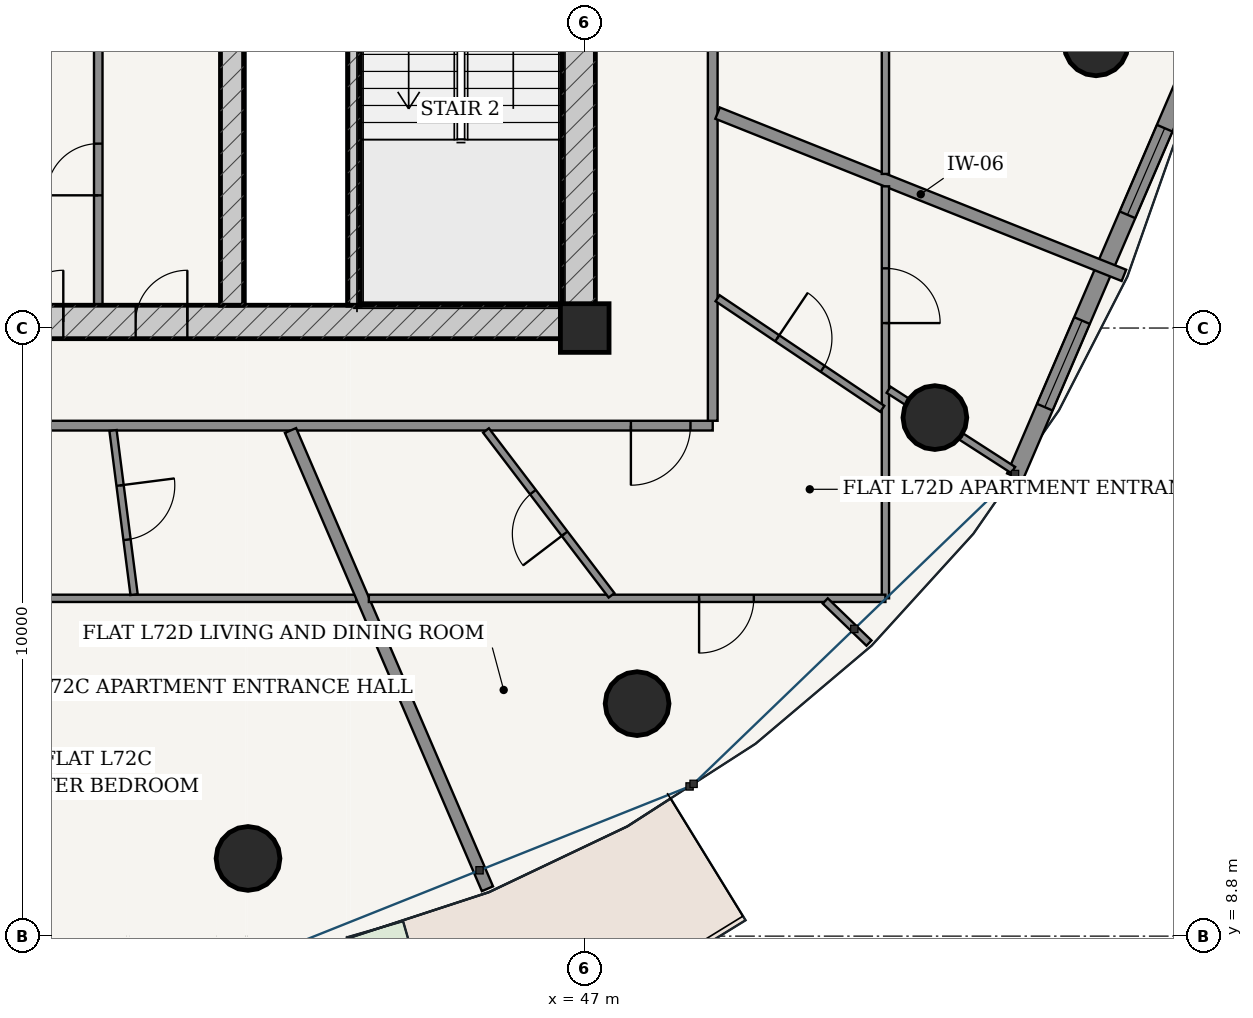
"""IFC4 building model, lengths in metres.
Left out: names, types, materials, properties, quantities, classifications, styles, units other than length and angle.
Written with IfcOpenShell. Run it as: python <this file> out.ifc"""

import sys

from ifc_helpers import new_model, si_unit, direction, frame, frame_2d, origin, origin_2d, place, context, subcontext, project, spatial, rectangle, hollow_circle, extrude, source, transform, mapped, element, fill, save


model = new_model("IFC4")
c1 = context("Model", 3, precision=1e-05, world=origin(), true_north=direction((-0.2419218956, 0.970295726276)))
c2 = subcontext(c1, "Body", "Model", "MODEL_VIEW")
j1 = project(units=[si_unit("LENGTHUNIT", "METRE"), si_unit("PLANEANGLEUNIT", "RADIAN")], contexts=[c1])
p1 = place(None, origin())
s1 = spatial("IfcSite", under=j1, at=p1, CompositionType="ELEMENT")
p2 = place(p1, origin())
s2 = spatial("IfcBuilding", under=s1, at=p2, CompositionType="ELEMENT")
p3 = place(p2, frame((0.0, 0.0, 274.45)))
s3 = spatial("IfcBuildingStorey", under=s2, at=p3, CompositionType="ELEMENT", Elevation=274.45)
p4 = place(p3, frame((47.0, 18.8, 0.0), z_axis=(0.0, 0.0, 1.0), x_axis=(1.0, 0.0, 0.0)))
e1 = element("IfcColumn", 1, at=p4, inside=s3, PredefinedType="COLUMN", context=c2, shape_type="SweptSolid", body=[
    extrude(rectangle(XDim=0.8, YDim=0.8, at=origin_2d()), origin(), (0.0, 0.0, 1.0), 3.75),
])
p5 = place(p3, frame((28.825, 18.9, 0.0), z_axis=(0.0, 0.0, 1.0), x_axis=(1.0, 0.0, 0.0)))
e2 = element("IfcWall", 2, at=p5, inside=s3, PredefinedType="SHEAR", context=c2, shape_type="SweptSolid", body=[
    extrude(rectangle(XDim=18.35, YDim=0.55, at=frame_2d((9.175, 0.0))), origin(), (0.0, 0.0, 1.0), 3.49),
])
p6 = place(p5, frame((6.71, 0.0, 0.0)))
e3 = element("IfcOpeningElement", 3, at=p6, cuts=e2, PredefinedType="OPENING", context=c2, shape_type="SweptSolid", body=[
    extrude(rectangle(XDim=0.85, YDim=2.1, at=frame_2d((0.425, 1.05))), frame((0.0, 0.285, 0.0), z_axis=(0.0, -1.0, 0.0), x_axis=(1.0, 0.0, 0.0)), (0.0, 0.0, 1.0), 0.57),
])
p7 = place(p5, frame((8.75, 0.0, 0.0)))
e4 = element("IfcOpeningElement", 4, at=p7, cuts=e2, PredefinedType="OPENING", context=c2, shape_type="SweptSolid", body=[
    extrude(rectangle(XDim=0.85, YDim=2.1, at=frame_2d((0.425, 1.05))), frame((0.0, 0.285, 0.0), z_axis=(0.0, -1.0, 0.0), x_axis=(1.0, 0.0, 0.0)), (0.0, 0.0, 1.0), 0.57),
])
p8 = place(p5, frame((10.79, 0.0, 0.0)))
e5 = element("IfcOpeningElement", 5, at=p8, cuts=e2, PredefinedType="OPENING", context=c2, shape_type="SweptSolid", body=[
    extrude(rectangle(XDim=0.85, YDim=2.1, at=frame_2d((0.425, 1.05))), frame((0.0, 0.285, 0.0), z_axis=(0.0, -1.0, 0.0), x_axis=(1.0, 0.0, 0.0)), (0.0, 0.0, 1.0), 0.57),
])
p9 = place(p3, frame((46.9, 19.175, 0.0), z_axis=(0.0, 0.0, 1.0), x_axis=(0.0, 1.0, 0.0)))
e6 = element("IfcWall", 6, at=p9, inside=s3, PredefinedType="SHEAR", context=c2, shape_type="SweptSolid", body=[
    extrude(rectangle(XDim=15.25, YDim=0.55, at=frame_2d((7.625, 0.0))), origin(), (0.0, 0.0, 1.0), 3.49),
])
p10 = place(p9, frame((9.875, 0.0, 0.0)))
e7 = element("IfcOpeningElement", 7, at=p10, cuts=e6, PredefinedType="OPENING", context=c2, shape_type="SweptSolid", body=[
    extrude(rectangle(XDim=1.5, YDim=2.2, at=frame_2d((0.75, 1.1))), frame((0.0, 0.285, 0.0), z_axis=(0.0, -1.0, 0.0), x_axis=(1.0, 0.0, 0.0)), (0.0, 0.0, 1.0), 0.57),
])
p11 = place(p3, frame((43.205, 19.175, 0.0), z_axis=(0.0, 0.0, 1.0), x_axis=(0.0, 1.0, 0.0)))
e8 = element("IfcWall", 8, at=p11, inside=s3, PredefinedType="SOLIDWALL", context=c2, shape_type="SweptSolid", body=[
    extrude(rectangle(XDim=7.375, YDim=0.2, at=frame_2d((3.688, 0.0))), origin(), (0.0, 0.0, 1.0), 3.49),
])
p12 = place(p3, frame((41.2, 19.175, 0.0), z_axis=(0.0, 0.0, 1.0), x_axis=(0.0, 1.0, 0.0)))
e9 = element("IfcWall", 9, at=p12, inside=s3, PredefinedType="SHEAR", context=c2, shape_type="SweptSolid", body=[
    extrude(rectangle(XDim=15.25, YDim=0.38, at=frame_2d((7.625, 0.0))), origin(), (0.0, 0.0, 1.0), 3.49),
])
p13 = place(p12, frame((7.8, 0.0, 0.0)))
e10 = element("IfcOpeningElement", 10, at=p13, cuts=e9, PredefinedType="OPENING", context=c2, shape_type="SweptSolid", body=[
    extrude(rectangle(XDim=1.05, YDim=2.15, at=frame_2d((0.525, 1.075))), frame((0.0, 0.2, 0.0), z_axis=(0.0, -1.0, 0.0), x_axis=(1.0, 0.0, 0.0)), (0.0, 0.0, 1.0), 0.4),
])
for number, where, z_axis, x_axis in (
    (11, (41.463, 10.078, 0.0), (0.0, 0.0, 1.0), (1.0, 0.0, 0.0)),
    (12, (47.861, 12.624, 0.0), (0.0, 0.0, 1.0), (1.0, 0.0, 0.0)),
    (13, (52.759, 17.328, 0.0), (0.0, 0.0, 1.0), (1.0, 0.0, 0.0)),
    (14, (55.409, 23.474, 0.0), (0.0, 0.0, 1.0), (1.0, 0.0, 0.0)),
):
    element("IfcColumn", number, at=place(p3, frame(where, z_axis=z_axis, x_axis=x_axis)), inside=s3, PredefinedType="COLUMN", context=c2, shape_type="SweptSolid", body=[
        extrude(hollow_circle(Radius=0.525, WallThickness=0.035, at=origin_2d()), origin(), (0.0, 0.0, 1.0), 3.75),
    ])
p14 = place(p3, frame((54.074, 16.354, 0.0), z_axis=(0.0, 0.0, 1.0), x_axis=(0.394816612978, 0.918759948037, 0.0)))
e15 = element("IfcWall", 15, at=p14, inside=s3, PredefinedType="SOLIDWALL", context=c2, shape_type="SweptSolid", body=[
    extrude(rectangle(XDim=7.485, YDim=0.28, at=frame_2d((3.743, 0.0))), origin(), (0.0, 0.0, 1.0), 3.49),
])
p15 = place(p14, frame((1.246, 0.0, 0.85)))
e16 = element("IfcOpeningElement", 16, at=p15, cuts=e15, PredefinedType="OPENING", context=c2, shape_type="SweptSolid", body=[
    extrude(rectangle(XDim=1.55, YDim=1.95, at=frame_2d((0.775, 0.975))), frame((0.0, 0.15, 0.0), z_axis=(0.0, -1.0, 0.0), x_axis=(1.0, 0.0, 0.0)), (0.0, 0.0, 1.0), 0.3),
])
p16 = place(p14, frame((4.689, 0.0, 0.85)))
e17 = element("IfcOpeningElement", 17, at=p16, cuts=e15, PredefinedType="OPENING", context=c2, shape_type="SweptSolid", body=[
    extrude(rectangle(XDim=1.55, YDim=1.95, at=frame_2d((0.775, 0.975))), frame((0.0, 0.15, 0.0), z_axis=(0.0, -1.0, 0.0), x_axis=(1.0, 0.0, 0.0)), (0.0, 0.0, 1.0), 0.3),
])
p17 = place(p3, frame((39.0, 19.175, 0.0), z_axis=(0.0, 0.0, 1.0), x_axis=(0.0, 1.0, 0.0)))
e18 = element("IfcWall", 18, at=p17, inside=s3, PredefinedType="PARTITIONING", context=c2, shape_type="SweptSolid", body=[
    extrude(rectangle(XDim=4.465, YDim=0.14, at=frame_2d((2.232, 0.0))), origin(), (0.0, 0.0, 1.0), 3.49),
])
p18 = place(p17, frame((1.808, 0.0, 0.0)))
e19 = element("IfcOpeningElement", 19, at=p18, cuts=e18, PredefinedType="OPENING", context=c2, shape_type="SweptSolid", body=[
    extrude(rectangle(XDim=0.85, YDim=2.1, at=frame_2d((0.425, 1.05))), frame((0.0, 0.08, 0.0), z_axis=(0.0, -1.0, 0.0), x_axis=(1.0, 0.0, 0.0)), (0.0, 0.0, 1.0), 0.16),
])
p19 = place(p3, frame((26.895, 17.195, 0.0), z_axis=(0.0, 0.0, 1.0), x_axis=(1.0, 0.0, 0.0)))
e20 = element("IfcWall", 20, at=p19, inside=s3, PredefinedType="PARTITIONING", context=c2, shape_type="SweptSolid", body=[
    extrude(rectangle(XDim=22.21, YDim=0.16, at=frame_2d((11.105, 0.0))), origin(), (0.0, 0.0, 1.0), 3.015),
])
p20 = place(p19, frame((9.746, 0.0, 0.0)))
e21 = element("IfcOpeningElement", 21, at=p20, cuts=e20, PredefinedType="OPENING", context=c2, shape_type="SweptSolid", body=[
    extrude(rectangle(XDim=0.98, YDim=2.2, at=frame_2d((0.49, 1.1))), frame((0.0, 0.09, 0.0), z_axis=(0.0, -1.0, 0.0), x_axis=(1.0, 0.0, 0.0)), (0.0, 0.0, 1.0), 0.18),
])
p21 = place(p19, frame((20.864, 0.0, 0.0)))
e22 = element("IfcOpeningElement", 22, at=p21, cuts=e20, PredefinedType="OPENING", context=c2, shape_type="SweptSolid", body=[
    extrude(rectangle(XDim=0.98, YDim=2.2, at=frame_2d((0.49, 1.1))), frame((0.0, 0.09, 0.0), z_axis=(0.0, -1.0, 0.0), x_axis=(1.0, 0.0, 0.0)), (0.0, 0.0, 1.0), 0.18),
])
p22 = place(p3, frame((49.105, 17.275, 0.0), z_axis=(0.0, 0.0, 1.0), x_axis=(0.0, 1.0, 0.0)))
e23 = element("IfcWall", 23, at=p22, inside=s3, PredefinedType="PARTITIONING", context=c2, shape_type="SweptSolid", body=[
    extrude(rectangle(XDim=13.925, YDim=0.16, at=frame_2d((6.962, 0.0))), origin(), (0.0, 0.0, 1.0), 3.015),
])
p23 = place(p22, frame((11.75, 0.0, 0.0)))
e24 = element("IfcOpeningElement", 24, at=p23, cuts=e23, PredefinedType="OPENING", context=c2, shape_type="SweptSolid", body=[
    extrude(rectangle(XDim=0.98, YDim=2.2, at=frame_2d((0.49, 1.1))), frame((0.0, 0.09, 0.0), z_axis=(0.0, -1.0, 0.0), x_axis=(1.0, 0.0, 0.0)), (0.0, 0.0, 1.0), 0.18),
])
p24 = place(p3, frame((49.185, 22.334, 0.0), z_axis=(0.0, 0.0, 1.0), x_axis=(0.928710518269, -0.370805573389, 0.0)))
e25 = element("IfcWall", 25, at=p24, inside=s3, PredefinedType="PARTITIONING", context=c2, shape_type="SweptSolid", body=[
    extrude(rectangle(XDim=7.195, YDim=0.2, at=frame_2d((3.598, 0.0))), origin(), (0.0, 0.0, 1.0), 3.121),
])
p25 = place(p3, frame((51.945, 34.12, 0.0), z_axis=(0.0, 0.0, 1.0), x_axis=(0.0, -1.0, 0.0)))
e26 = element("IfcWall", 26, at=p25, inside=s3, PredefinedType="PARTITIONING", context=c2, shape_type="SweptSolid", body=[
    extrude(rectangle(XDim=12.786, YDim=0.12, at=frame_2d((6.393, 0.0))), origin(), (0.0, 0.0, 1.0), 3.015),
])
p26 = place(p25, frame((2.562, 0.0, 0.0)))
e27 = element("IfcOpeningElement", 27, at=p26, cuts=e26, PredefinedType="OPENING", context=c2, shape_type="SweptSolid", body=[
    extrude(rectangle(XDim=0.9, YDim=2.15, at=frame_2d((0.45, 1.075))), frame((0.0, 0.07, 0.0), z_axis=(0.0, -1.0, 0.0), x_axis=(1.0, 0.0, 0.0)), (0.0, 0.0, 1.0), 0.14),
])
p27 = place(p3, frame((43.246, 14.355, 0.0), z_axis=(0.0, 0.0, 1.0), x_axis=(-1.0, 0.0, 0.0)))
e28 = element("IfcWall", 28, at=p27, inside=s3, PredefinedType="PARTITIONING", context=c2, shape_type="SweptSolid", body=[
    extrude(rectangle(XDim=13.771, YDim=0.12, at=frame_2d((6.885, 0.0))), origin(), (0.0, 0.0, 1.0), 3.015),
])
p28 = place(p27, frame((5.244, 0.0, 0.0)))
e29 = element("IfcOpeningElement", 29, at=p28, cuts=e28, PredefinedType="OPENING", context=c2, shape_type="SweptSolid", body=[
    extrude(rectangle(XDim=0.9, YDim=2.15, at=frame_2d((0.45, 1.075))), frame((0.0, 0.07, 0.0), z_axis=(0.0, -1.0, 0.0), x_axis=(1.0, 0.0, 0.0)), (0.0, 0.0, 1.0), 0.14),
])
p29 = place(p3, frame((39.243, 17.115, 0.0), z_axis=(0.0, 0.0, 1.0), x_axis=(0.127336357758, -0.991859592882, 0.0)))
e30 = element("IfcWall", 30, at=p29, inside=s3, PredefinedType="PARTITIONING", context=c2, shape_type="SweptSolid", body=[
    extrude(rectangle(XDim=2.721, YDim=0.12, at=frame_2d((1.36, 0.0))), origin(), (0.0, 0.0, 1.0), 3.209),
])
p30 = place(p29, frame((0.91, 0.0, 0.0)))
e31 = element("IfcOpeningElement", 31, at=p30, cuts=e30, PredefinedType="OPENING", context=c2, shape_type="SweptSolid", body=[
    extrude(rectangle(XDim=0.9, YDim=2.15, at=frame_2d((0.45, 1.075))), frame((0.0, 0.07, 0.0), z_axis=(0.0, -1.0, 0.0), x_axis=(1.0, 0.0, 0.0)), (0.0, 0.0, 1.0), 0.14),
])
p31 = place(p3, frame((42.162, 17.115, 0.0), z_axis=(0.0, 0.0, 1.0), x_axis=(0.394795631127, -0.918768964236, 0.0)))
e32 = element("IfcWall", 32, at=p31, inside=s3, PredefinedType="PARTITIONING", context=c2, shape_type="SweptSolid", body=[
    extrude(rectangle(XDim=8.202, YDim=0.2, at=frame_2d((4.101, 0.0))), origin(), (0.0, 0.0, 1.0), 3.121),
])
p32 = place(p3, frame((51.945, 21.13, 0.0), z_axis=(0.0, 0.0, 1.0), x_axis=(0.0, -1.0, 0.0)))
e33 = element("IfcWall", 33, at=p32, inside=s3, PredefinedType="PARTITIONING", context=c2, shape_type="SweptSolid", body=[
    extrude(rectangle(XDim=6.775, YDim=0.12, at=frame_2d((3.388, 0.0))), origin(), (0.0, 0.0, 1.0), 3.015),
])
p33 = place(p32, frame((1.349, 0.0, 0.0)))
e34 = element("IfcOpeningElement", 34, at=p33, cuts=e33, PredefinedType="OPENING", context=c2, shape_type="SweptSolid", body=[
    extrude(rectangle(XDim=0.9, YDim=2.15, at=frame_2d((0.45, 1.075))), frame((0.0, 0.07, 0.0), z_axis=(0.0, -1.0, 0.0), x_axis=(1.0, 0.0, 0.0)), (0.0, 0.0, 1.0), 0.14),
])
p34 = place(p3, frame((51.945, 14.355, 0.0), z_axis=(0.0, 0.0, 1.0), x_axis=(-1.0, 0.0, 0.0)))
e35 = element("IfcWall", 35, at=p34, inside=s3, PredefinedType="PARTITIONING", context=c2, shape_type="SweptSolid", body=[
    extrude(rectangle(XDim=8.495, YDim=0.12, at=frame_2d((4.248, 0.0))), origin(), (0.0, 0.0, 1.0), 3.015),
])
p35 = place(p34, frame((2.164, 0.0, 0.0)))
e36 = element("IfcOpeningElement", 36, at=p35, cuts=e35, PredefinedType="OPENING", context=c2, shape_type="SweptSolid", body=[
    extrude(rectangle(XDim=0.9, YDim=2.15, at=frame_2d((0.45, 1.075))), frame((0.0, 0.07, 0.0), z_axis=(0.0, -1.0, 0.0), x_axis=(1.0, 0.0, 0.0)), (0.0, 0.0, 1.0), 0.14),
])
p36 = place(p3, frame((50.956, 14.312, 0.0), z_axis=(0.0, 0.0, 1.0), x_axis=(0.7199490242, -0.694026946562, 0.0)))
e37 = element("IfcWall", 37, at=p36, inside=s3, PredefinedType="PARTITIONING", context=c2, shape_type="SweptSolid", body=[
    extrude(rectangle(XDim=0.998, YDim=0.12, at=frame_2d((0.499, 0.0))), origin(), (0.0, 0.0, 1.0), 3.49),
])
p37 = place(p3, frame((51.997, 17.785, 0.0), z_axis=(0.0, 0.0, 1.0), x_axis=(0.840715962824, -0.541476379774, 0.0)))
e38 = element("IfcWall", 38, at=p37, inside=s3, PredefinedType="PARTITIONING", context=c2, shape_type="SweptSolid", body=[
    extrude(rectangle(XDim=2.437, YDim=0.12, at=frame_2d((1.219, 0.0))), origin(), (0.0, 0.0, 1.0), 3.015),
])
p38 = place(p3, frame((45.377, 17.115, 0.0), z_axis=(0.0, 0.0, 1.0), x_axis=(0.60588776962, -0.795550130806, 0.0)))
e39 = element("IfcWall", 39, at=p38, inside=s3, PredefinedType="PARTITIONING", context=c2, shape_type="SweptSolid", body=[
    extrude(rectangle(XDim=3.407, YDim=0.12, at=frame_2d((1.704, 0.0))), origin(), (0.0, 0.0, 1.0), 3.209),
])
p39 = place(p38, frame((1.274, 0.0, 0.0)))
e40 = element("IfcOpeningElement", 40, at=p39, cuts=e39, PredefinedType="OPENING", context=c2, shape_type="SweptSolid", body=[
    extrude(rectangle(XDim=0.86, YDim=2.15, at=frame_2d((0.43, 1.075))), frame((0.0, 0.07, 0.0), z_axis=(0.0, -1.0, 0.0), x_axis=(1.0, 0.0, 0.0)), (0.0, 0.0, 1.0), 0.14),
])
p40 = place(p3, frame((49.185, 19.29, 0.0), z_axis=(0.0, 0.0, 1.0), x_axis=(0.830215193761, -0.557443030316, 0.0)))
e41 = element("IfcWall", 41, at=p40, inside=s3, PredefinedType="PARTITIONING", context=c2, shape_type="SweptSolid", body=[
    extrude(rectangle(XDim=3.262, YDim=0.12, at=frame_2d((1.631, 0.0))), origin(), (0.0, 0.0, 1.0), 3.209),
])
p41 = place(p40, frame((1.181, 0.0, 0.0)))
e42 = element("IfcOpeningElement", 42, at=p41, cuts=e41, PredefinedType="OPENING", context=c2, shape_type="SweptSolid", body=[
    extrude(rectangle(XDim=0.9, YDim=2.15, at=frame_2d((0.45, 1.075))), frame((0.0, 0.07, 0.0), z_axis=(0.0, -1.0, 0.0), x_axis=(1.0, 0.0, 0.0)), (0.0, 0.0, 1.0), 0.14),
])
m1 = source(origin(), c2, "Body", "SweptSolid", [
    extrude(rectangle(XDim=1.55, YDim=1.95, at=frame_2d((0.775, 0.975))), frame((0.0, 0.03, 0.0), z_axis=(0.0, -1.0, 0.0), x_axis=(1.0, 0.0, 0.0)), (0.0, 0.0, 1.0), 0.06),
])
p42 = place(p15, origin())
e43 = element("IfcWindow", 43, at=p42, inside=s3, PartitioningType="SINGLE_PANEL", PredefinedType="WINDOW", context=c2, shape_type="MappedRepresentation", body=[
    mapped(m1, transform((0.0, 0.0, 0.0), scale=1.0)),
])
fill(e16, e43)
p43 = place(p16, origin())
e44 = element("IfcWindow", 44, at=p43, inside=s3, PartitioningType="SINGLE_PANEL", PredefinedType="WINDOW", context=c2, shape_type="MappedRepresentation", body=[
    mapped(m1, transform((0.0, 0.0, 0.0), scale=1.0)),
])
fill(e17, e44)
m2 = source(origin(), c2, "Body", "SweptSolid", [
    extrude(rectangle(XDim=0.85, YDim=2.1, at=frame_2d((0.425, 1.05))), frame((0.0, 0.025, 0.0), z_axis=(0.0, -1.0, 0.0), x_axis=(1.0, 0.0, 0.0)), (0.0, 0.0, 1.0), 0.05),
])
p44 = place(p7, origin())
e45 = element("IfcDoor", 45, at=p44, inside=s3, OperationType="SINGLE_SWING_RIGHT", PredefinedType="DOOR", context=c2, shape_type="MappedRepresentation", body=[
    mapped(m2, transform((0.0, 0.0, 0.0), scale=1.0)),
])
fill(e4, e45)
p45 = place(p8, origin())
e46 = element("IfcDoor", 46, at=p45, inside=s3, OperationType="SINGLE_SWING_RIGHT", PredefinedType="DOOR", context=c2, shape_type="MappedRepresentation", body=[
    mapped(m2, transform((0.0, 0.0, 0.0), scale=1.0)),
])
fill(e5, e46)
p46 = place(p18, origin())
e47 = element("IfcDoor", 47, at=p46, inside=s3, OperationType="SINGLE_SWING_LEFT", PredefinedType="DOOR", context=c2, shape_type="MappedRepresentation", body=[
    mapped(m2, transform((0.0, 0.0, 0.0), scale=1.0)),
])
fill(e19, e47)
m3 = source(origin(), c2, "Body", "SweptSolid", [
    extrude(rectangle(XDim=0.9, YDim=2.15, at=frame_2d((0.45, 1.075))), frame((0.0, 0.025, 0.0), z_axis=(0.0, -1.0, 0.0), x_axis=(1.0, 0.0, 0.0)), (0.0, 0.0, 1.0), 0.05),
])
p47 = place(p30, origin())
e48 = element("IfcDoor", 48, at=p47, inside=s3, OperationType="SINGLE_SWING_LEFT", PredefinedType="DOOR", context=c2, shape_type="MappedRepresentation", body=[
    mapped(m3, transform((0.0, 0.0, 0.0), scale=1.0)),
])
fill(e31, e48)
m4 = source(origin(), c2, "Body", "SweptSolid", [
    extrude(rectangle(XDim=0.98, YDim=2.2, at=frame_2d((0.49, 1.1))), frame((0.0, 0.025, 0.0), z_axis=(0.0, -1.0, 0.0), x_axis=(1.0, 0.0, 0.0)), (0.0, 0.0, 1.0), 0.05),
])
p48 = place(p21, frame((0.98, 0.0, 0.0), z_axis=(0.0, 0.0, 1.0), x_axis=(-1.0, 0.0, 0.0)))
e49 = element("IfcDoor", 49, at=p48, inside=s3, OperationType="SINGLE_SWING_RIGHT", PredefinedType="DOOR", context=c2, shape_type="MappedRepresentation", body=[
    mapped(m4, transform((0.0, 0.0, 0.0), scale=1.0)),
])
fill(e22, e49)
m5 = source(origin(), c2, "Body", "SweptSolid", [
    extrude(rectangle(XDim=0.86, YDim=2.15, at=frame_2d((0.43, 1.075))), frame((0.0, 0.025, 0.0), z_axis=(0.0, -1.0, 0.0), x_axis=(1.0, 0.0, 0.0)), (0.0, 0.0, 1.0), 0.05),
])
p49 = place(p39, frame((0.86, 0.0, 0.0), z_axis=(0.0, 0.0, 1.0), x_axis=(-1.0, 0.0, 0.0)))
e50 = element("IfcDoor", 50, at=p49, inside=s3, OperationType="SINGLE_SWING_LEFT", PredefinedType="DOOR", context=c2, shape_type="MappedRepresentation", body=[
    mapped(m5, transform((0.0, 0.0, 0.0), scale=1.0)),
])
fill(e40, e50)
p50 = place(p35, origin())
e51 = element("IfcDoor", 51, at=p50, inside=s3, OperationType="SINGLE_SWING_RIGHT", PredefinedType="DOOR", context=c2, shape_type="MappedRepresentation", body=[
    mapped(m3, transform((0.0, 0.0, 0.0), scale=1.0)),
])
fill(e36, e51)
p51 = place(p41, origin())
e52 = element("IfcDoor", 52, at=p51, inside=s3, OperationType="SINGLE_SWING_LEFT", PredefinedType="DOOR", context=c2, shape_type="MappedRepresentation", body=[
    mapped(m3, transform((0.0, 0.0, 0.0), scale=1.0)),
])
fill(e42, e52)
p52 = place(p33, origin())
e53 = element("IfcDoor", 53, at=p52, inside=s3, OperationType="SINGLE_SWING_RIGHT", PredefinedType="DOOR", context=c2, shape_type="MappedRepresentation", body=[
    mapped(m3, transform((0.0, 0.0, 0.0), scale=1.0)),
])
fill(e34, e53)
save(model, sys.argv[1])
